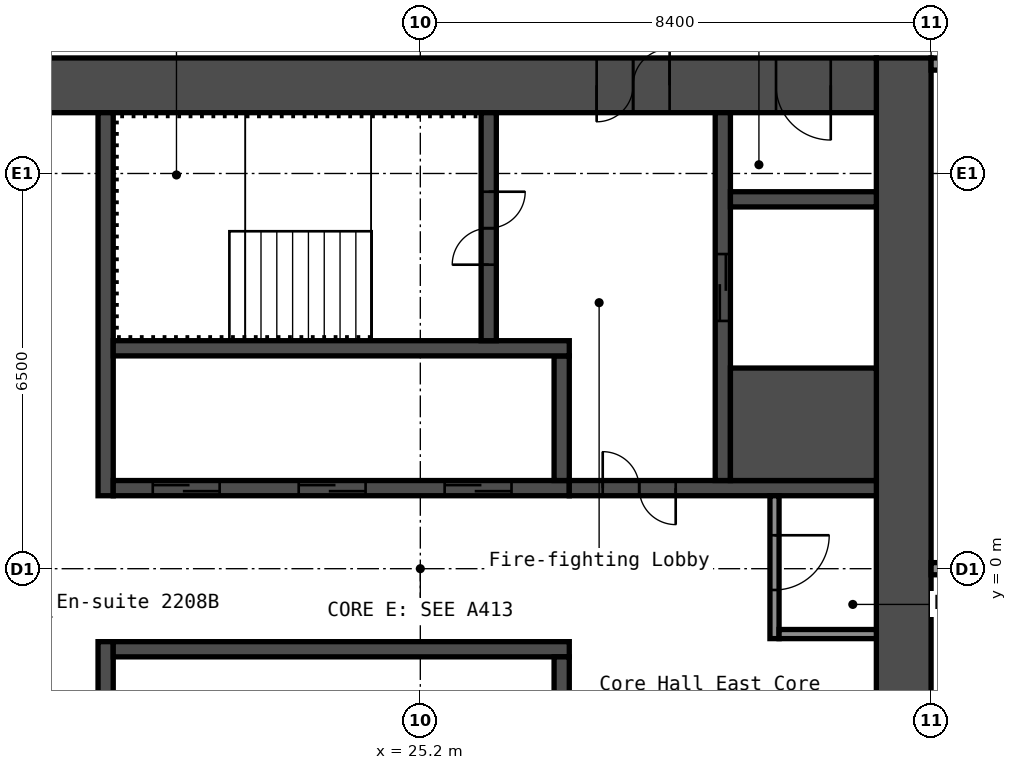
"""IFC4 building model, lengths in metres.
Left out: names, types, materials, properties, quantities, classifications, styles, units other than length and angle.
Written with IfcOpenShell. Run it as: python <this file> out.ifc"""

import sys

from ifc_helpers import new_model, si_unit, direction, frame, frame_2d, origin, place, context, subcontext, project, spatial, rectangle, extrude, element, fill, save


model = new_model("IFC4")
c1 = context("Model", 3, precision=1e-05, world=origin(), true_north=direction((0.0, 1.0)))
c2 = subcontext(c1, "Body", "Model", "MODEL_VIEW")
j1 = project(units=[si_unit("LENGTHUNIT", "METRE"), si_unit("PLANEANGLEUNIT", "RADIAN")], contexts=[c1])
p1 = place(None, origin())
s1 = spatial("IfcSite", under=j1, at=p1, CompositionType="ELEMENT")
p2 = place(p1, origin())
s2 = spatial("IfcBuilding", under=s1, at=p2, CompositionType="ELEMENT")
p3 = place(p2, frame((0.0, 0.0, 81.8)))
s3 = spatial("IfcBuildingStorey", under=s2, at=p3, CompositionType="ELEMENT", Elevation=81.8)
p4 = place(p3, frame((33.15, -8.4, 0.0), z_axis=(0.0, 0.0, 1.0), x_axis=(0.0, 1.0, 0.0)))
e1 = element("IfcWall", 1, at=p4, inside=s3, PredefinedType="SHEAR", context=c2, shape_type="SweptSolid", body=[
    extrude(rectangle(XDim=16.8, YDim=0.9, at=frame_2d((8.4, 0.0))), origin(), (0.0, 0.0, 1.0), 2.8),
])
p5 = place(p3, frame((17.7, 7.95, 0.0), z_axis=(0.0, 0.0, 1.0), x_axis=(1.0, 0.0, 0.0)))
e2 = element("IfcWall", 2, at=p5, inside=s3, PredefinedType="SHEAR", context=c2, shape_type="SweptSolid", body=[
    extrude(rectangle(XDim=15.0, YDim=0.9, at=frame_2d((7.5, 0.0))), origin(), (0.0, 0.0, 1.0), 2.8),
])
p6 = place(p5, frame((10.4, 0.0, 0.0)))
e3 = element("IfcOpeningElement", 3, at=p6, cuts=e2, PredefinedType="OPENING", context=c2, shape_type="SweptSolid", body=[
    extrude(rectangle(XDim=1.2, YDim=2.1, at=frame_2d((0.6, 1.05))), frame((0.0, 0.46, 0.0), z_axis=(0.0, -1.0, 0.0), x_axis=(1.0, 0.0, 0.0)), (0.0, 0.0, 1.0), 0.92),
])
p7 = place(p5, frame((13.35, 0.0, 0.0)))
e4 = element("IfcOpeningElement", 4, at=p7, cuts=e2, PredefinedType="OPENING", context=c2, shape_type="SweptSolid", body=[
    extrude(rectangle(XDim=0.9, YDim=2.1, at=frame_2d((0.45, 1.05))), frame((0.0, 0.46, 0.0), z_axis=(0.0, -1.0, 0.0), x_axis=(1.0, 0.0, 0.0)), (0.0, 0.0, 1.0), 0.92),
])
p8 = place(p3, frame((20.025, 1.2, 0.0), z_axis=(0.0, 0.0, 1.0), x_axis=(0.0, 1.0, 0.0)))
e5 = element("IfcWall", 5, at=p8, inside=s3, PredefinedType="SHEAR", context=c2, shape_type="SweptSolid", body=[
    extrude(rectangle(XDim=6.3, YDim=0.25, at=frame_2d((3.15, 0.0))), origin(), (0.0, 0.0, 1.0), 2.8),
])
p9 = place(p3, frame((20.025, -7.5, 0.0), z_axis=(0.0, 0.0, 1.0), x_axis=(0.0, 1.0, 0.0)))
e6 = element("IfcWall", 6, at=p9, inside=s3, PredefinedType="SHEAR", context=c2, shape_type="SweptSolid", body=[
    extrude(rectangle(XDim=6.3, YDim=0.25, at=frame_2d((3.15, 0.0))), origin(), (0.0, 0.0, 1.0), 2.8),
])
p10 = place(p9, frame((2.4, 0.0, 0.0)))
e7 = element("IfcOpeningElement", 7, at=p10, cuts=e6, PredefinedType="OPENING", context=c2, shape_type="SweptSolid", body=[
    extrude(rectangle(XDim=1.0, YDim=2.1, at=frame_2d((0.5, 1.05))), frame((0.0, 0.135, 0.0), z_axis=(0.0, -1.0, 0.0), x_axis=(1.0, 0.0, 0.0)), (0.0, 0.0, 1.0), 0.27),
])
p11 = place(p3, frame((20.15, 1.325, 0.0), z_axis=(0.0, 0.0, 1.0), x_axis=(1.0, 0.0, 0.0)))
e8 = element("IfcWall", 8, at=p11, inside=s3, PredefinedType="SHEAR", context=c2, shape_type="SweptSolid", body=[
    extrude(rectangle(XDim=7.5, YDim=0.25, at=frame_2d((3.75, 0.0))), origin(), (0.0, 0.0, 1.0), 2.8),
])
p12 = place(p11, frame((0.65, 0.0, 0.0)))
e9 = element("IfcOpeningElement", 9, at=p12, cuts=e8, PredefinedType="OPENING", context=c2, shape_type="SweptSolid", body=[
    extrude(rectangle(XDim=1.1, YDim=2.1, at=frame_2d((0.55, 1.05))), frame((0.0, 0.135, 0.0), z_axis=(0.0, -1.0, 0.0), x_axis=(1.0, 0.0, 0.0)), (0.0, 0.0, 1.0), 0.27),
])
p13 = place(p11, frame((3.05, 0.0, 0.0)))
e10 = element("IfcOpeningElement", 10, at=p13, cuts=e8, PredefinedType="OPENING", context=c2, shape_type="SweptSolid", body=[
    extrude(rectangle(XDim=1.1, YDim=2.1, at=frame_2d((0.55, 1.05))), frame((0.0, 0.135, 0.0), z_axis=(0.0, -1.0, 0.0), x_axis=(1.0, 0.0, 0.0)), (0.0, 0.0, 1.0), 0.27),
])
p14 = place(p11, frame((5.45, 0.0, 0.0)))
e11 = element("IfcOpeningElement", 11, at=p14, cuts=e8, PredefinedType="OPENING", context=c2, shape_type="SweptSolid", body=[
    extrude(rectangle(XDim=1.1, YDim=2.1, at=frame_2d((0.55, 1.05))), frame((0.0, 0.135, 0.0), z_axis=(0.0, -1.0, 0.0), x_axis=(1.0, 0.0, 0.0)), (0.0, 0.0, 1.0), 0.27),
])
p15 = place(p3, frame((27.525, 1.45, 0.0), z_axis=(0.0, 0.0, 1.0), x_axis=(0.0, 1.0, 0.0)))
e12 = element("IfcWall", 12, at=p15, inside=s3, PredefinedType="SHEAR", context=c2, shape_type="SweptSolid", body=[
    extrude(rectangle(XDim=2.05, YDim=0.25, at=frame_2d((1.025, 0.0))), origin(), (0.0, 0.0, 1.0), 2.8),
])
p16 = place(p3, frame((20.15, 3.625, 0.0), z_axis=(0.0, 0.0, 1.0), x_axis=(1.0, 0.0, 0.0)))
e13 = element("IfcWall", 13, at=p16, inside=s3, PredefinedType="SHEAR", context=c2, shape_type="SweptSolid", body=[
    extrude(rectangle(XDim=7.5, YDim=0.25, at=frame_2d((3.75, 0.0))), origin(), (0.0, 0.0, 1.0), 2.8),
])
p17 = place(p3, frame((26.325, 3.75, 0.0), z_axis=(0.0, 0.0, 1.0), x_axis=(0.0, 1.0, 0.0)))
e14 = element("IfcWall", 14, at=p17, inside=s3, PredefinedType="SHEAR", context=c2, shape_type="SweptSolid", body=[
    extrude(rectangle(XDim=3.75, YDim=0.25, at=frame_2d((1.875, 0.0))), origin(), (0.0, 0.0, 1.0), 2.8),
])
p18 = place(p17, frame((1.25, 0.0, 0.0)))
e15 = element("IfcOpeningElement", 15, at=p18, cuts=e14, PredefinedType="OPENING", context=c2, shape_type="SweptSolid", body=[
    extrude(rectangle(XDim=1.2, YDim=2.1, at=frame_2d((0.6, 1.05))), frame((0.0, 0.135, 0.0), z_axis=(0.0, -1.0, 0.0), x_axis=(1.0, 0.0, 0.0)), (0.0, 0.0, 1.0), 0.27),
])
p19 = place(p3, frame((27.65, 1.325, 0.0), z_axis=(0.0, 0.0, 1.0), x_axis=(1.0, 0.0, 0.0)))
e16 = element("IfcWall", 16, at=p19, inside=s3, PredefinedType="SHEAR", context=c2, shape_type="SweptSolid", body=[
    extrude(rectangle(XDim=5.05, YDim=0.25, at=frame_2d((2.525, 0.0))), origin(), (0.0, 0.0, 1.0), 2.8),
])
p20 = place(p19, frame((0.55, 0.0, 0.0)))
e17 = element("IfcOpeningElement", 17, at=p20, cuts=e16, PredefinedType="OPENING", context=c2, shape_type="SweptSolid", body=[
    extrude(rectangle(XDim=1.2, YDim=2.1, at=frame_2d((0.6, 1.05))), frame((0.0, 0.135, 0.0), z_axis=(0.0, -1.0, 0.0), x_axis=(1.0, 0.0, 0.0)), (0.0, 0.0, 1.0), 0.27),
])
p21 = place(p3, frame((30.175, 1.45, 0.0), z_axis=(0.0, 0.0, 1.0), x_axis=(0.0, 1.0, 0.0)))
e18 = element("IfcWall", 18, at=p21, inside=s3, PredefinedType="SHEAR", context=c2, shape_type="SweptSolid", body=[
    extrude(rectangle(XDim=6.05, YDim=0.25, at=frame_2d((3.025, 0.0))), origin(), (0.0, 0.0, 1.0), 2.8),
])
p22 = place(p21, frame((2.625, 0.0, 0.0)))
e19 = element("IfcOpeningElement", 19, at=p22, cuts=e18, PredefinedType="OPENING", context=c2, shape_type="SweptSolid", body=[
    extrude(rectangle(XDim=1.1, YDim=2.1, at=frame_2d((0.55, 1.05))), frame((0.0, 0.135, 0.0), z_axis=(0.0, -1.0, 0.0), x_axis=(1.0, 0.0, 0.0)), (0.0, 0.0, 1.0), 0.27),
])
p23 = place(p3, frame((30.3, 2.375, 0.0), z_axis=(0.0, 0.0, 1.0), x_axis=(1.0, 0.0, 0.0)))
e20 = element("IfcWall", 20, at=p23, inside=s3, PredefinedType="SHEAR", context=c2, shape_type="SweptSolid", body=[
    extrude(rectangle(XDim=2.4, YDim=1.85, at=frame_2d((1.2, 0.0))), origin(), (0.0, 0.0, 1.0), 2.8),
])
p24 = place(p3, frame((30.3, 6.075, 0.0), z_axis=(0.0, 0.0, 1.0), x_axis=(1.0, 0.0, 0.0)))
e21 = element("IfcWall", 21, at=p24, inside=s3, PredefinedType="SHEAR", context=c2, shape_type="SweptSolid", body=[
    extrude(rectangle(XDim=2.4, YDim=0.25, at=frame_2d((1.2, 0.0))), origin(), (0.0, 0.0, 1.0), 2.8),
])
p25 = place(p3, frame((20.15, -1.325, 0.0), z_axis=(0.0, 0.0, 1.0), x_axis=(1.0, 0.0, 0.0)))
e22 = element("IfcWall", 22, at=p25, inside=s3, PredefinedType="SHEAR", context=c2, shape_type="SweptSolid", body=[
    extrude(rectangle(XDim=7.5, YDim=0.25, at=frame_2d((3.75, 0.0))), origin(), (0.0, 0.0, 1.0), 2.8),
])
p26 = place(p3, frame((27.525, -3.5, 0.0), z_axis=(0.0, 0.0, 1.0), x_axis=(0.0, 1.0, 0.0)))
e23 = element("IfcWall", 23, at=p26, inside=s3, PredefinedType="SHEAR", context=c2, shape_type="SweptSolid", body=[
    extrude(rectangle(XDim=2.05, YDim=0.25, at=frame_2d((1.025, 0.0))), origin(), (0.0, 0.0, 1.0), 2.8),
])
p27 = place(p3, frame((31.025, -1.15, 0.0), z_axis=(0.0, 0.0, 1.0), x_axis=(0.0, 1.0, 0.0)))
e24 = element("IfcWall", 24, at=p27, inside=s3, PredefinedType="PARTITIONING", context=c2, shape_type="SweptSolid", body=[
    extrude(rectangle(XDim=2.35, YDim=0.15, at=frame_2d((1.175, 0.0))), origin(), (0.0, 0.0, 1.0), 2.8),
])
p28 = place(p27, frame((0.8, 0.0, 0.0)))
e25 = element("IfcOpeningElement", 25, at=p28, cuts=e24, PredefinedType="OPENING", context=c2, shape_type="SweptSolid", body=[
    extrude(rectangle(XDim=0.9, YDim=2.1, at=frame_2d((0.45, 1.05))), frame((0.0, 0.085, 0.0), z_axis=(0.0, -1.0, 0.0), x_axis=(1.0, 0.0, 0.0)), (0.0, 0.0, 1.0), 0.17),
])
p29 = place(p3, frame((31.1, -1.075, 0.0), z_axis=(0.0, 0.0, 1.0), x_axis=(1.0, 0.0, 0.0)))
e26 = element("IfcWall", 26, at=p29, inside=s3, PredefinedType="PARTITIONING", context=c2, shape_type="SweptSolid", body=[
    extrude(rectangle(XDim=1.6, YDim=0.15, at=frame_2d((0.8, 0.0))), origin(), (0.0, 0.0, 1.0), 2.8),
])
p30 = place(p3, frame((33.6, 0.0, 0.0), z_axis=(0.0, 0.0, 1.0), x_axis=(1.0, 0.0, 0.0)))
e27 = element("IfcWall", 27, at=p30, inside=s3, PredefinedType="PARTITIONING", context=c2, shape_type="SweptSolid", body=[
    extrude(rectangle(XDim=10.3, YDim=0.2, at=frame_2d((5.15, 0.0))), origin(), (0.0, 0.0, 1.0), 2.8),
])
p31 = place(p3, frame((33.6, 8.3, 0.0), z_axis=(0.0, 0.0, 1.0), x_axis=(1.0, 0.0, 0.0)))
e28 = element("IfcWall", 28, at=p31, inside=s3, PredefinedType="PARTITIONING", context=c2, shape_type="SweptSolid", body=[
    extrude(rectangle(XDim=10.4, YDim=0.2, at=frame_2d((5.2, 0.0))), origin(), (0.0, 0.0, 1.0), 2.8),
])
p32 = place(p31, frame((2.1, 0.0, 0.0)))
e29 = element("IfcOpeningElement", 29, at=p32, cuts=e28, PredefinedType="OPENING", context=c2, shape_type="SweptSolid", body=[
    extrude(rectangle(XDim=1.0, YDim=2.1, at=frame_2d((0.5, 1.05))), frame((0.0, 0.11, 0.0), z_axis=(0.0, -1.0, 0.0), x_axis=(1.0, 0.0, 0.0)), (0.0, 0.0, 1.0), 0.22),
])
p33 = place(p6, origin())
e30 = element("IfcDoor", 30, at=p33, inside=s3, OperationType="DOUBLE_DOOR_SINGLE_SWING", PredefinedType="DOOR", context=c2, shape_type="SweptSolid", body=[
    extrude(rectangle(XDim=1.2, YDim=2.1, at=frame_2d((0.6, 1.05))), frame((0.0, 0.025, 0.0), z_axis=(0.0, -1.0, 0.0), x_axis=(1.0, 0.0, 0.0)), (0.0, 0.0, 1.0), 0.05),
])
fill(e3, e30)
p34 = place(p7, origin())
e31 = element("IfcDoor", 31, at=p34, inside=s3, OperationType="SINGLE_SWING_RIGHT", PredefinedType="DOOR", context=c2, shape_type="SweptSolid", body=[
    extrude(rectangle(XDim=0.9, YDim=2.1, at=frame_2d((0.45, 1.05))), frame((0.0, 0.025, 0.0), z_axis=(0.0, -1.0, 0.0), x_axis=(1.0, 0.0, 0.0)), (0.0, 0.0, 1.0), 0.05),
])
fill(e4, e31)
p35 = place(p18, origin())
e32 = element("IfcDoor", 32, at=p35, inside=s3, OperationType="DOUBLE_DOOR_SINGLE_SWING", PredefinedType="DOOR", context=c2, shape_type="SweptSolid", body=[
    extrude(rectangle(XDim=1.2, YDim=2.1, at=frame_2d((0.6, 1.05))), frame((0.0, 0.025, 0.0), z_axis=(0.0, -1.0, 0.0), x_axis=(1.0, 0.0, 0.0)), (0.0, 0.0, 1.0), 0.05),
])
fill(e15, e32)
p36 = place(p20, origin())
e33 = element("IfcDoor", 33, at=p36, inside=s3, OperationType="DOUBLE_DOOR_SINGLE_SWING", PredefinedType="DOOR", context=c2, shape_type="SweptSolid", body=[
    extrude(rectangle(XDim=1.2, YDim=2.1, at=frame_2d((0.6, 1.05))), frame((0.0, 0.025, 0.0), z_axis=(0.0, -1.0, 0.0), x_axis=(1.0, 0.0, 0.0)), (0.0, 0.0, 1.0), 0.05),
])
fill(e17, e33)
p37 = place(p28, origin())
e34 = element("IfcDoor", 34, at=p37, inside=s3, OperationType="SINGLE_SWING_RIGHT", PredefinedType="DOOR", context=c2, shape_type="SweptSolid", body=[
    extrude(rectangle(XDim=0.9, YDim=2.1, at=frame_2d((0.45, 1.05))), frame((0.0, 0.025, 0.0), z_axis=(0.0, -1.0, 0.0), x_axis=(1.0, 0.0, 0.0)), (0.0, 0.0, 1.0), 0.05),
])
fill(e25, e34)
p38 = place(p12, origin())
e35 = element("IfcDoor", 35, at=p38, inside=s3, OperationType="DOUBLE_DOOR_SLIDING", PredefinedType="DOOR", context=c2, shape_type="SweptSolid", body=[
    extrude(rectangle(XDim=1.1, YDim=2.1, at=frame_2d((0.55, 1.05))), frame((0.0, 0.025, 0.0), z_axis=(0.0, -1.0, 0.0), x_axis=(1.0, 0.0, 0.0)), (0.0, 0.0, 1.0), 0.05),
])
fill(e9, e35)
p39 = place(p13, origin())
e36 = element("IfcDoor", 36, at=p39, inside=s3, OperationType="DOUBLE_DOOR_SLIDING", PredefinedType="DOOR", context=c2, shape_type="SweptSolid", body=[
    extrude(rectangle(XDim=1.1, YDim=2.1, at=frame_2d((0.55, 1.05))), frame((0.0, 0.025, 0.0), z_axis=(0.0, -1.0, 0.0), x_axis=(1.0, 0.0, 0.0)), (0.0, 0.0, 1.0), 0.05),
])
fill(e10, e36)
p40 = place(p14, origin())
e37 = element("IfcDoor", 37, at=p40, inside=s3, OperationType="DOUBLE_DOOR_SLIDING", PredefinedType="DOOR", context=c2, shape_type="SweptSolid", body=[
    extrude(rectangle(XDim=1.1, YDim=2.1, at=frame_2d((0.55, 1.05))), frame((0.0, 0.025, 0.0), z_axis=(0.0, -1.0, 0.0), x_axis=(1.0, 0.0, 0.0)), (0.0, 0.0, 1.0), 0.05),
])
fill(e11, e37)
p41 = place(p22, origin())
e38 = element("IfcDoor", 38, at=p41, inside=s3, OperationType="DOUBLE_DOOR_SLIDING", PredefinedType="DOOR", context=c2, shape_type="SweptSolid", body=[
    extrude(rectangle(XDim=1.1, YDim=2.1, at=frame_2d((0.55, 1.05))), frame((0.0, 0.025, 0.0), z_axis=(0.0, -1.0, 0.0), x_axis=(1.0, 0.0, 0.0)), (0.0, 0.0, 1.0), 0.05),
])
fill(e19, e38)
save(model, sys.argv[1])
